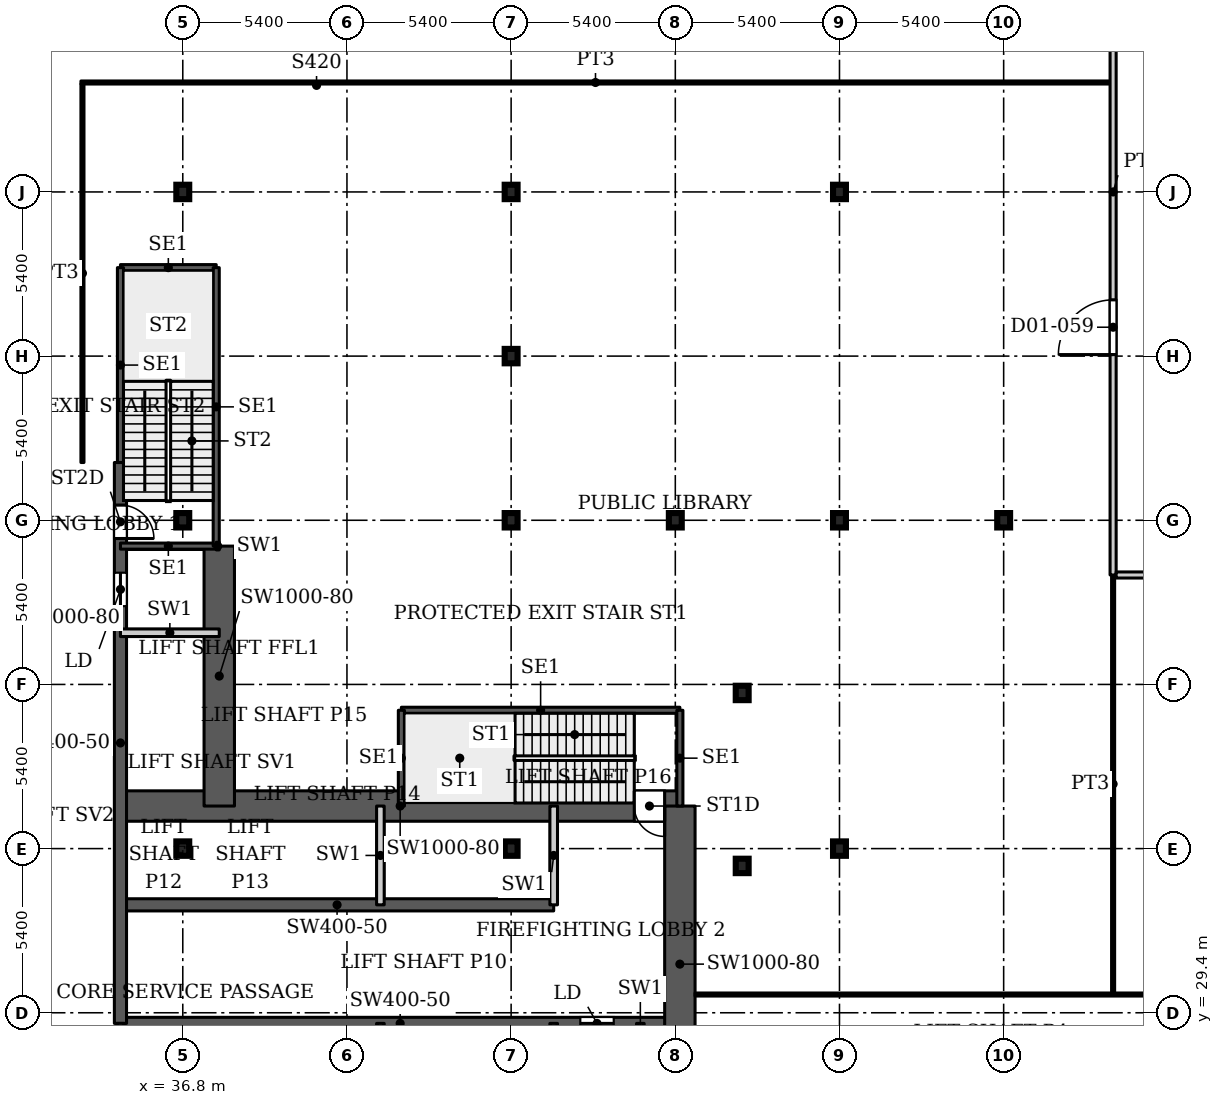
"""IFC4 building model, lengths in metres.
Left out: names, types, materials, properties, quantities, classifications, styles, units other than length and angle.
Written with IfcOpenShell. Run it as: python <this file> out.ifc"""

import sys

from ifc_helpers import new_model, si_unit, direction, frame, frame_2d, origin, origin_2d, place, context, subcontext, project, spatial, rectangle, i_section, extrude, source, transform, mapped, element, fill, save


model = new_model("IFC4")
c1 = context("Model", 3, precision=1e-05, world=origin(), true_north=direction((0.0, 1.0)))
c2 = subcontext(c1, "Body", "Model", "MODEL_VIEW")
j1 = project(units=[si_unit("LENGTHUNIT", "METRE"), si_unit("PLANEANGLEUNIT", "RADIAN")], contexts=[c1])
p1 = place(None, origin())
s1 = spatial("IfcSite", under=j1, at=p1, CompositionType="ELEMENT")
p2 = place(p1, origin())
s2 = spatial("IfcBuilding", under=s1, at=p2, CompositionType="ELEMENT")
p3 = place(p2, frame((0.0, 0.0, 7.5)))
s3 = spatial("IfcBuildingStorey", under=s2, at=p3, CompositionType="ELEMENT", Elevation=7.5)
for number, where, z_axis, x_axis in (
    (1, (36.8, 34.8, 0.0), (0.0, 0.0, 1.0), (1.0, 0.0, 0.0)),
    (2, (47.6, 34.8, 0.0), (0.0, 0.0, 1.0), (1.0, 0.0, 0.0)),
    (3, (58.4, 34.8, 0.0), (0.0, 0.0, 1.0), (1.0, 0.0, 0.0)),
    (4, (36.8, 45.6, 0.0), (0.0, 0.0, 1.0), (1.0, 0.0, 0.0)),
    (5, (47.6, 45.6, 0.0), (0.0, 0.0, 1.0), (1.0, 0.0, 0.0)),
    (6, (58.4, 45.6, 0.0), (0.0, 0.0, 1.0), (1.0, 0.0, 0.0)),
    (7, (36.8, 56.4, 0.0), (0.0, 0.0, 1.0), (1.0, 0.0, 0.0)),
    (8, (47.6, 56.4, 0.0), (0.0, 0.0, 1.0), (1.0, 0.0, 0.0)),
    (9, (58.4, 56.4, 0.0), (0.0, 0.0, 1.0), (1.0, 0.0, 0.0)),
    (10, (53.0, 45.6, 0.0), (0.0, 0.0, 1.0), (1.0, 0.0, 0.0)),
    (11, (63.8, 45.6, 0.0), (0.0, 0.0, 1.0), (1.0, 0.0, 0.0)),
    (12, (47.6, 51.0, 0.0), (0.0, 0.0, 1.0), (1.0, 0.0, 0.0)),
    (13, (55.2, 34.23, 0.0), (0.0, 0.0, 1.0), (1.0, 0.0, 0.0)),
    (14, (55.2, 39.92, 0.0), (0.0, 0.0, 1.0), (1.0, 0.0, 0.0)),
):
    element("IfcColumn", number, at=place(p3, frame(where, z_axis=z_axis, x_axis=x_axis)), inside=s3, PredefinedType="COLUMN", context=c2, shape_type="SweptSolid", body=[
        extrude(i_section(OverallWidth=0.424, OverallDepth=0.474, WebThickness=0.048, FlangeThickness=0.077, FilletRadius=0.014, at=origin_2d()), origin(), (0.0, 0.0, 1.0), 5.0),
    ])
p4 = place(p3, frame((34.75, 29.05, 0.0), z_axis=(0.0, 0.0, 1.0), x_axis=(1.0, 0.0, 0.0)))
e15 = element("IfcWall", 15, at=p4, inside=s3, PredefinedType="SHEAR", context=c2, shape_type="SweptSolid", body=[
    extrude(rectangle(XDim=18.4, YDim=0.4, at=frame_2d((9.2, 0.0))), origin(), (0.0, 0.0, 1.0), 5.0),
])
p5 = place(p4, frame((15.125, 0.0, 0.0)))
e16 = element("IfcOpeningElement", 16, at=p5, cuts=e15, PredefinedType="OPENING", context=c2, shape_type="SweptSolid", body=[
    extrude(rectangle(XDim=1.1, YDim=2.2, at=frame_2d((0.55, 1.1))), frame((0.0, 0.21, 0.0), z_axis=(0.0, -1.0, 0.0), x_axis=(1.0, 0.0, 0.0)), (0.0, 0.0, 1.0), 0.42),
])
p6 = place(p3, frame((34.75, 32.95, 0.0), z_axis=(0.0, 0.0, 1.0), x_axis=(1.0, 0.0, 0.0)))
e17 = element("IfcWall", 17, at=p6, inside=s3, PredefinedType="SHEAR", context=c2, shape_type="SweptSolid", body=[
    extrude(rectangle(XDim=14.25, YDim=0.4, at=frame_2d((7.125, 0.0))), origin(), (0.0, 0.0, 1.0), 5.0),
])
p7 = place(p3, frame((34.75, 36.2, 0.0), z_axis=(0.0, 0.0, 1.0), x_axis=(1.0, 0.0, 0.0)))
e18 = element("IfcWall", 18, at=p7, inside=s3, PredefinedType="SHEAR", context=c2, shape_type="SweptSolid", body=[
    extrude(rectangle(XDim=18.4, YDim=1.0, at=frame_2d((9.2, 0.0))), origin(), (0.0, 0.0, 1.0), 5.0),
])
p8 = place(p7, frame((16.9, 0.0, 0.0)))
e19 = element("IfcOpeningElement", 19, at=p8, cuts=e18, PredefinedType="OPENING", context=c2, shape_type="SweptSolid", body=[
    extrude(rectangle(XDim=1.0, YDim=2.2, at=frame_2d((0.5, 1.1))), frame((0.0, 0.51, 0.0), z_axis=(0.0, -1.0, 0.0), x_axis=(1.0, 0.0, 0.0)), (0.0, 0.0, 1.0), 1.02),
])
p9 = place(p3, frame((34.75, 29.05, 0.0), z_axis=(0.0, 0.0, 1.0), x_axis=(0.0, 1.0, 0.0)))
e20 = element("IfcWall", 20, at=p9, inside=s3, PredefinedType="SHEAR", context=c2, shape_type="SweptSolid", body=[
    extrude(rectangle(XDim=18.45, YDim=0.4, at=frame_2d((9.225, 0.0))), origin(), (0.0, 0.0, 1.0), 5.0),
])
p10 = place(p9, frame((13.725, 0.0, 0.0)))
e21 = element("IfcOpeningElement", 21, at=p10, cuts=e20, PredefinedType="OPENING", context=c2, shape_type="SweptSolid", body=[
    extrude(rectangle(XDim=1.1, YDim=2.2, at=frame_2d((0.55, 1.1))), frame((0.0, 0.21, 0.0), z_axis=(0.0, -1.0, 0.0), x_axis=(1.0, 0.0, 0.0)), (0.0, 0.0, 1.0), 0.42),
])
p11 = place(p9, frame((15.95, 0.0, 0.0)))
e22 = element("IfcOpeningElement", 22, at=p11, cuts=e20, PredefinedType="OPENING", context=c2, shape_type="SweptSolid", body=[
    extrude(rectangle(XDim=1.1, YDim=2.2, at=frame_2d((0.55, 1.1))), frame((0.0, 0.21, 0.0), z_axis=(0.0, -1.0, 0.0), x_axis=(1.0, 0.0, 0.0)), (0.0, 0.0, 1.0), 0.42),
])
p12 = place(p3, frame((38.0, 36.2, 0.0), z_axis=(0.0, 0.0, 1.0), x_axis=(0.0, 1.0, 0.0)))
e23 = element("IfcWall", 23, at=p12, inside=s3, PredefinedType="SHEAR", context=c2, shape_type="SweptSolid", body=[
    extrude(rectangle(XDim=8.55, YDim=1.0, at=frame_2d((4.275, 0.0))), origin(), (0.0, 0.0, 1.0), 5.0),
])
p13 = place(p3, frame((53.15, 25.8, 0.0), z_axis=(0.0, 0.0, 1.0), x_axis=(0.0, 1.0, 0.0)))
e24 = element("IfcWall", 24, at=p13, inside=s3, PredefinedType="SHEAR", context=c2, shape_type="SweptSolid", body=[
    extrude(rectangle(XDim=10.4, YDim=1.0, at=frame_2d((5.2, 0.0))), origin(), (0.0, 0.0, 1.0), 5.0),
])
p14 = place(p3, frame((43.99, 39.35, 0.0), z_axis=(0.0, 0.0, 1.0), x_axis=(1.0, 0.0, 0.0)))
e25 = element("IfcWall", 25, at=p14, inside=s3, PredefinedType="SHEAR", context=c2, shape_type="SweptSolid", body=[
    extrude(rectangle(XDim=9.16, YDim=0.2, at=frame_2d((4.58, 0.0))), origin(), (0.0, 0.0, 1.0), 5.0),
])
for number, where, z_axis, x_axis in (
    (26, (43.99, 36.2, 0.0), (0.0, 0.0, 1.0), (0.0, 1.0, 0.0)),
    (27, (53.15, 36.2, 0.0), (0.0, 0.0, 1.0), (0.0, 1.0, 0.0)),
):
    element("IfcWall", number, at=place(p3, frame(where, z_axis=z_axis, x_axis=x_axis)), inside=s3, PredefinedType="SHEAR", context=c2, shape_type="SweptSolid", body=[
        extrude(rectangle(XDim=3.15, YDim=0.2, at=frame_2d((1.575, 0.0))), origin(), (0.0, 0.0, 1.0), 5.0),
    ])
for number, where, z_axis, x_axis in (
    (28, (34.75, 44.75, 0.0), (0.0, 0.0, 1.0), (1.0, 0.0, 0.0)),
    (29, (34.75, 53.91, 0.0), (0.0, 0.0, 1.0), (1.0, 0.0, 0.0)),
):
    element("IfcWall", number, at=place(p3, frame(where, z_axis=z_axis, x_axis=x_axis)), inside=s3, PredefinedType="SHEAR", context=c2, shape_type="SweptSolid", body=[
        extrude(rectangle(XDim=3.15, YDim=0.2, at=frame_2d((1.575, 0.0))), origin(), (0.0, 0.0, 1.0), 5.0),
    ])
p15 = place(p3, frame((34.75, 47.5, 0.0), z_axis=(0.0, 0.0, 1.0), x_axis=(0.0, 1.0, 0.0)))
e30 = element("IfcWall", 30, at=p15, inside=s3, PredefinedType="SHEAR", context=c2, shape_type="SweptSolid", body=[
    extrude(rectangle(XDim=6.41, YDim=0.2, at=frame_2d((3.205, 0.0))), origin(), (0.0, 0.0, 1.0), 5.0),
])
p16 = place(p3, frame((37.9, 44.75, 0.0), z_axis=(0.0, 0.0, 1.0), x_axis=(0.0, 1.0, 0.0)))
e31 = element("IfcWall", 31, at=p16, inside=s3, PredefinedType="SHEAR", context=c2, shape_type="SweptSolid", body=[
    extrude(rectangle(XDim=9.16, YDim=0.2, at=frame_2d((4.58, 0.0))), origin(), (0.0, 0.0, 1.0), 5.0),
])
for number, where, z_axis, x_axis in (
    (32, (34.75, 25.8, 0.0), (0.0, 0.0, 1.0), (0.0, 1.0, 0.0)),
    (33, (43.3, 25.8, 0.0), (0.0, 0.0, 1.0), (0.0, 1.0, 0.0)),
    (34, (43.3, 32.95, 0.0), (0.0, 0.0, 1.0), (0.0, 1.0, 0.0)),
    (35, (49.0, 25.8, 0.0), (0.0, 0.0, 1.0), (0.0, 1.0, 0.0)),
    (36, (49.0, 32.95, 0.0), (0.0, 0.0, 1.0), (0.0, 1.0, 0.0)),
    (37, (51.85, 25.8, 0.0), (0.0, 0.0, 1.0), (0.0, 1.0, 0.0)),
    (38, (34.75, 41.9, 0.0), (0.0, 0.0, 1.0), (1.0, 0.0, 0.0)),
):
    element("IfcWall", number, at=place(p3, frame(where, z_axis=z_axis, x_axis=x_axis)), inside=s3, PredefinedType="PARTITIONING", context=c2, shape_type="SweptSolid", body=[
        extrude(rectangle(XDim=3.25, YDim=0.25, at=frame_2d((1.625, 0.0))), origin(), (0.0, 0.0, 1.0), 5.0),
    ])
p17 = place(p3, frame((37.9, 44.75, 0.0), z_axis=(0.0, 0.0, 1.0), x_axis=(1.0, 0.0, 0.0)))
e39 = element("IfcWall", 39, at=p17, inside=s3, PredefinedType="PARTITIONING", context=c2, shape_type="SweptSolid", body=[
    extrude(rectangle(XDim=0.1, YDim=0.25, at=frame_2d((0.05, 0.0))), origin(), (0.0, 0.0, 1.0), 5.0),
])
p18 = place(p3, frame((33.45, 60.0, 0.0), z_axis=(0.0, 0.0, 1.0), x_axis=(1.0, 0.0, 0.0)))
e40 = element("IfcWall", 40, at=p18, inside=s3, PredefinedType="PARTITIONING", context=c2, shape_type="SweptSolid", body=[
    extrude(rectangle(XDim=33.85, YDim=0.1, at=frame_2d((16.925, 0.0))), origin(), (0.0, 0.0, 1.0), 4.68),
])
p19 = place(p3, frame((33.5, 47.5, 0.0), z_axis=(0.0, 0.0, 1.0), x_axis=(0.0, 1.0, 0.0)))
e41 = element("IfcWall", 41, at=p19, inside=s3, PredefinedType="PARTITIONING", context=c2, shape_type="SweptSolid", body=[
    extrude(rectangle(XDim=12.45, YDim=0.1, at=frame_2d((6.225, 0.0))), origin(), (0.0, 0.0, 1.0), 4.68),
])
p20 = place(p3, frame((53.649, 30.0, 0.0), z_axis=(0.0, 0.0, 1.0), x_axis=(1.0, 0.0, 0.0)))
e42 = element("IfcWall", 42, at=p20, inside=s3, PredefinedType="PARTITIONING", context=c2, shape_type="SweptSolid", body=[
    extrude(rectangle(XDim=38.301, YDim=0.1, at=frame_2d((19.15, 0.0))), origin(), (0.0, 0.0, 1.0), 4.68),
])
p21 = place(p3, frame((67.4, 30.05, 0.0), z_axis=(0.0, 0.0, 1.0), x_axis=(0.0, 1.0, 0.0)))
e43 = element("IfcWall", 43, at=p21, inside=s3, PredefinedType="PARTITIONING", context=c2, shape_type="SweptSolid", body=[
    extrude(rectangle(XDim=13.75, YDim=0.1, at=frame_2d((6.875, 0.0))), origin(), (0.0, 0.0, 1.0), 4.68),
])
p22 = place(p3, frame((67.4, 43.8, 0.0), z_axis=(0.0, 0.0, 1.0), x_axis=(0.0, 1.0, 0.0)))
e44 = element("IfcWall", 44, at=p22, inside=s3, PredefinedType="PARTITIONING", context=c2, shape_type="SweptSolid", body=[
    extrude(rectangle(XDim=25.2, YDim=0.2, at=frame_2d((12.6, 0.0))), origin(), (0.0, 0.0, 1.0), 4.68),
])
p23 = place(p22, frame((7.25, 0.0, 0.0)))
e45 = element("IfcOpeningElement", 45, at=p23, cuts=e44, PredefinedType="OPENING", context=c2, shape_type="SweptSolid", body=[
    extrude(rectangle(XDim=1.8, YDim=2.1, at=frame_2d((0.9, 1.05))), frame((0.0, 0.11, 0.0), z_axis=(0.0, -1.0, 0.0), x_axis=(1.0, 0.0, 0.0)), (0.0, 0.0, 1.0), 0.22),
])
p24 = place(p22, frame((19.75, 0.0, 0.0)))
e46 = element("IfcOpeningElement", 46, at=p24, cuts=e44, PredefinedType="OPENING", context=c2, shape_type="SweptSolid", body=[
    extrude(rectangle(XDim=1.8, YDim=2.1, at=frame_2d((0.9, 1.05))), frame((0.0, 0.11, 0.0), z_axis=(0.0, -1.0, 0.0), x_axis=(1.0, 0.0, 0.0)), (0.0, 0.0, 1.0), 0.22),
])
p25 = place(p3, frame((67.5, 43.8, 0.0), z_axis=(0.0, 0.0, 1.0), x_axis=(1.0, 0.0, 0.0)))
e47 = element("IfcWall", 47, at=p25, inside=s3, PredefinedType="PARTITIONING", context=c2, shape_type="SweptSolid", body=[
    extrude(rectangle(XDim=24.4, YDim=0.2, at=frame_2d((12.2, 0.0))), origin(), (0.0, 0.0, 1.0), 4.68),
])
p26 = place(p25, frame((11.3, 0.0, 0.0)))
e48 = element("IfcOpeningElement", 48, at=p26, cuts=e47, PredefinedType="OPENING", context=c2, shape_type="SweptSolid", body=[
    extrude(rectangle(XDim=1.8, YDim=2.1, at=frame_2d((0.9, 1.05))), frame((0.0, 0.11, 0.0), z_axis=(0.0, -1.0, 0.0), x_axis=(1.0, 0.0, 0.0)), (0.0, 0.0, 1.0), 0.22),
])
m1 = source(origin(), c2, "Body", "SweptSolid", [
    extrude(rectangle(XDim=1.1, YDim=2.2, at=frame_2d((0.55, 1.1))), frame((0.0, 0.025, 0.0), z_axis=(0.0, -1.0, 0.0), x_axis=(1.0, 0.0, 0.0)), (0.0, 0.0, 1.0), 0.05),
])
p27 = place(p10, origin())
e49 = element("IfcDoor", 49, at=p27, inside=s3, OperationType="SLIDING_TO_LEFT", PredefinedType="DOOR", context=c2, shape_type="MappedRepresentation", body=[
    mapped(m1, transform((0.0, 0.0, 0.0), x_axis=(1.0, 0.0, 0.0), y_axis=(0.0, 1.0, 0.0), z_axis=(0.0, 0.0, 1.0), scale=1.0)),
])
fill(e21, e49)
p28 = place(p5, origin())
e50 = element("IfcDoor", 50, at=p28, inside=s3, OperationType="SLIDING_TO_LEFT", PredefinedType="DOOR", context=c2, shape_type="MappedRepresentation", body=[
    mapped(m1, transform((0.0, 0.0, 0.0), x_axis=(1.0, 0.0, 0.0), y_axis=(0.0, 1.0, 0.0), z_axis=(0.0, 0.0, 1.0), scale=1.0)),
])
fill(e16, e50)
m2 = source(origin(), c2, "Body", "SweptSolid", [
    extrude(rectangle(XDim=1.0, YDim=2.2, at=frame_2d((0.5, 1.1))), frame((0.0, 0.025, 0.0), z_axis=(0.0, -1.0, 0.0), x_axis=(1.0, 0.0, 0.0)), (0.0, 0.0, 1.0), 0.05),
])
p29 = place(p8, origin())
e51 = element("IfcDoor", 51, at=p29, inside=s3, OperationType="SINGLE_SWING_RIGHT", PredefinedType="DOOR", context=c2, shape_type="MappedRepresentation", body=[
    mapped(m2, transform((0.0, 0.0, 0.0), x_axis=(1.0, 0.0, 0.0), y_axis=(0.0, 1.0, 0.0), z_axis=(0.0, 0.0, 1.0), scale=1.0)),
])
fill(e19, e51)
m3 = source(origin(), c2, "Body", "SweptSolid", [
    extrude(rectangle(XDim=1.1, YDim=2.2, at=frame_2d((0.55, 1.1))), frame((0.0, 0.025, 0.0), z_axis=(0.0, -1.0, 0.0), x_axis=(1.0, 0.0, 0.0)), (0.0, 0.0, 1.0), 0.05),
])
p30 = place(p11, origin())
e52 = element("IfcDoor", 52, at=p30, inside=s3, OperationType="SINGLE_SWING_RIGHT", PredefinedType="DOOR", context=c2, shape_type="MappedRepresentation", body=[
    mapped(m3, transform((0.0, 0.0, 0.0), x_axis=(1.0, 0.0, 0.0), y_axis=(0.0, 1.0, 0.0), z_axis=(0.0, 0.0, 1.0), scale=1.0)),
])
fill(e22, e52)
m4 = source(origin(), c2, "Body", "SweptSolid", [
    extrude(rectangle(XDim=1.8, YDim=2.1, at=frame_2d((0.9, 1.05))), frame((0.0, 0.025, 0.0), z_axis=(0.0, -1.0, 0.0), x_axis=(1.0, 0.0, 0.0)), (0.0, 0.0, 1.0), 0.05),
])
p31 = place(p23, origin())
e53 = element("IfcDoor", 53, at=p31, inside=s3, OperationType="DOUBLE_DOOR_SINGLE_SWING", PredefinedType="DOOR", context=c2, shape_type="MappedRepresentation", body=[
    mapped(m4, transform((0.0, 0.0, 0.0), x_axis=(1.0, 0.0, 0.0), y_axis=(0.0, 1.0, 0.0), z_axis=(0.0, 0.0, 1.0), scale=1.0)),
])
fill(e45, e53)
save(model, sys.argv[1])
